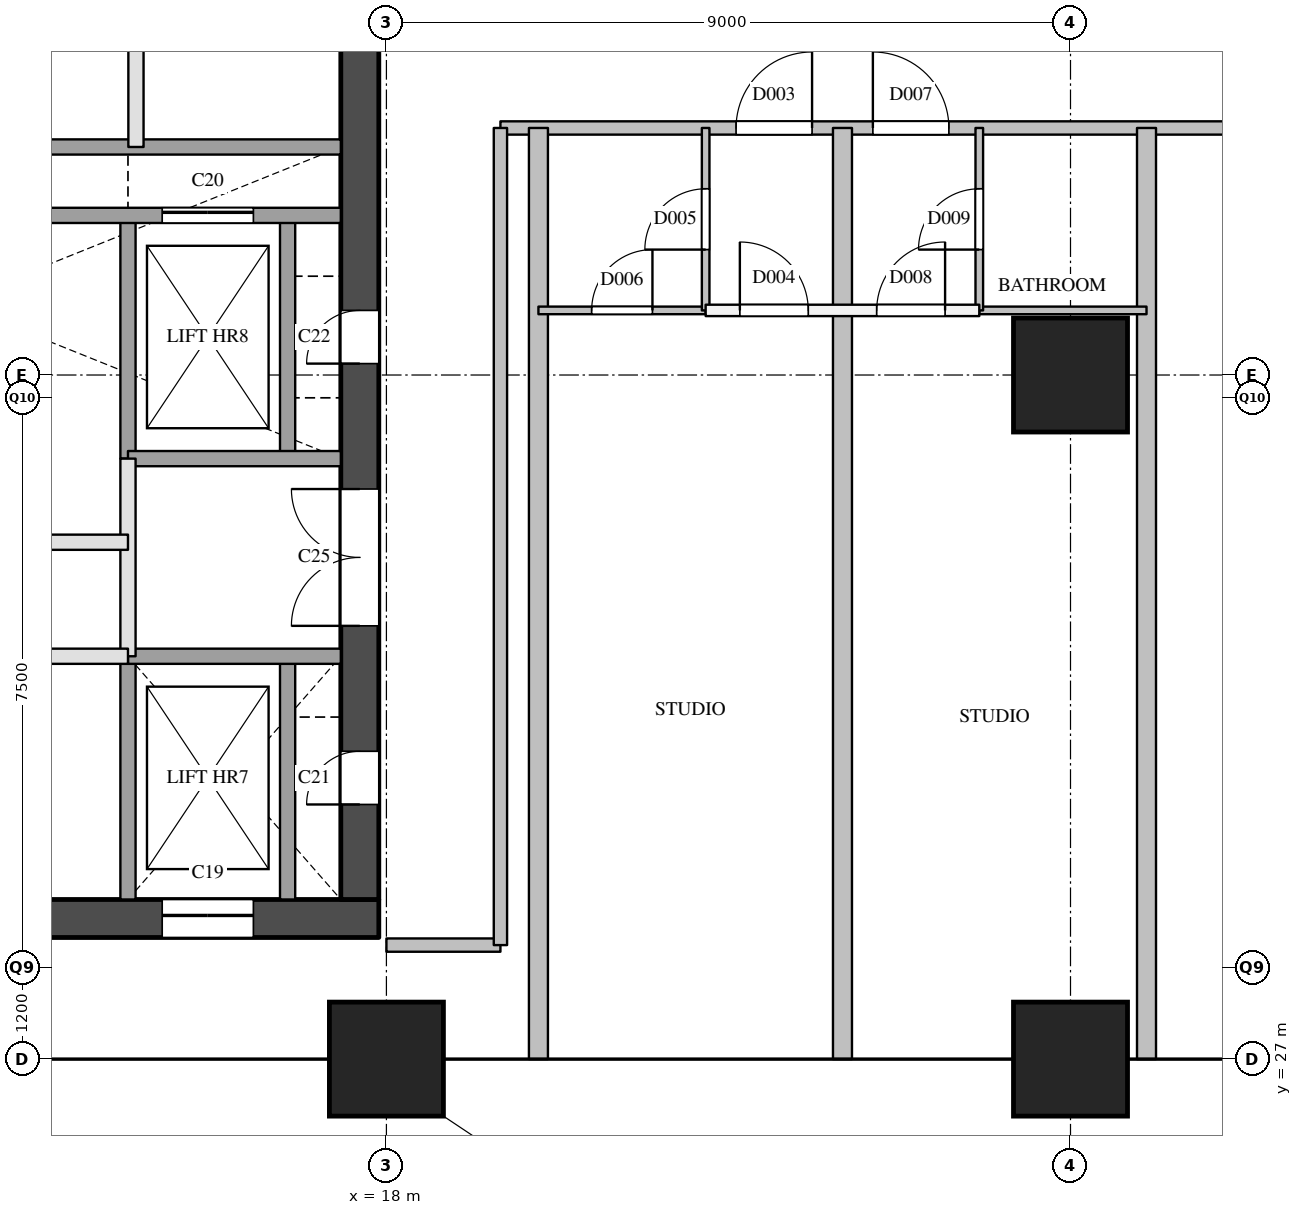
"""IFC4 building model, lengths in metres.
Left out: names, types, materials, properties, quantities, classifications, styles, units other than length and angle.
Written with IfcOpenShell. Run it as: python <this file> out.ifc"""

import sys

from ifc_helpers import new_model, si_unit, direction, frame, frame_2d, origin, origin_2d, place, context, subcontext, project, spatial, rectangle, extrude, element, fill, save


model = new_model("IFC4")
c1 = context("Model", 3, precision=1e-05, world=origin(), true_north=direction((0.0, 1.0)))
c2 = subcontext(c1, "Body", "Model", "MODEL_VIEW")
j1 = project(units=[si_unit("LENGTHUNIT", "METRE"), si_unit("PLANEANGLEUNIT", "RADIAN")], contexts=[c1])
p1 = place(None, origin())
s1 = spatial("IfcSite", under=j1, at=p1, CompositionType="ELEMENT")
p2 = place(p1, origin())
s2 = spatial("IfcBuilding", under=s1, at=p2, CompositionType="ELEMENT")
p3 = place(p2, frame((0.0, 0.0, 173.9)))
s3 = spatial("IfcBuildingStorey", under=s2, at=p3, CompositionType="ELEMENT", Elevation=173.9)
for number, where, z_axis, x_axis in (
    (1, (18.0, 27.0, 0.0), (0.0, 0.0, 1.0), (1.0, 0.0, 0.0)),
    (2, (27.0, 27.0, 0.0), (0.0, 0.0, 1.0), (1.0, 0.0, 0.0)),
    (3, (27.0, 36.0, 0.0), (0.0, 0.0, 1.0), (1.0, 0.0, 0.0)),
):
    element("IfcColumn", number, at=place(p3, frame(where, z_axis=z_axis, x_axis=x_axis)), inside=s3, PredefinedType="COLUMN", context=c2, shape_type="SweptSolid", body=[
        extrude(rectangle(XDim=1.5, YDim=1.5, at=origin_2d()), origin(), (0.0, 0.0, 1.0), 3.9),
    ])
p4 = place(p3, frame((5.7, 28.85, 0.0), z_axis=(0.0, 0.0, 1.0), x_axis=(1.0, 0.0, 0.0)))
e4 = element("IfcWall", 4, at=p4, inside=s3, PredefinedType="SHEAR", context=c2, shape_type="SweptSolid", body=[
    extrude(rectangle(XDim=12.2, YDim=0.5, at=frame_2d((6.1, 0.0))), origin(), (0.0, 0.0, 1.0), 3.6),
])
p5 = place(p4, frame((9.35, 0.0, 0.0)))
e5 = element("IfcOpeningElement", 5, at=p5, cuts=e4, PredefinedType="OPENING", context=c2, shape_type="SweptSolid", body=[
    extrude(rectangle(XDim=1.2, YDim=2.1, at=frame_2d((0.6, 1.05))), frame((0.0, 0.26, 0.0), z_axis=(0.0, -1.0, 0.0), x_axis=(1.0, 0.0, 0.0)), (0.0, 0.0, 1.0), 0.52),
])
p6 = place(p3, frame((17.65, 29.1, 0.0), z_axis=(0.0, 0.0, 1.0), x_axis=(0.0, 1.0, 0.0)))
e6 = element("IfcWall", 6, at=p6, inside=s3, PredefinedType="SHEAR", context=c2, shape_type="SweptSolid", body=[
    extrude(rectangle(XDim=20.3, YDim=0.5, at=frame_2d((10.15, 0.0))), origin(), (0.0, 0.0, 1.0), 3.6),
])
p7 = place(p6, frame((1.25, 0.0, 0.0)))
e7 = element("IfcOpeningElement", 7, at=p7, cuts=e6, PredefinedType="OPENING", context=c2, shape_type="SweptSolid", body=[
    extrude(rectangle(XDim=0.7, YDim=2.1, at=frame_2d((0.35, 1.05))), frame((0.0, 0.26, 0.0), z_axis=(0.0, -1.0, 0.0), x_axis=(1.0, 0.0, 0.0)), (0.0, 0.0, 1.0), 0.52),
])
p8 = place(p6, frame((7.05, 0.0, 0.0)))
e8 = element("IfcOpeningElement", 8, at=p8, cuts=e6, PredefinedType="OPENING", context=c2, shape_type="SweptSolid", body=[
    extrude(rectangle(XDim=0.7, YDim=2.1, at=frame_2d((0.35, 1.05))), frame((0.0, 0.26, 0.0), z_axis=(0.0, -1.0, 0.0), x_axis=(1.0, 0.0, 0.0)), (0.0, 0.0, 1.0), 0.52),
])
p9 = place(p6, frame((3.6, 0.0, 0.0)))
e9 = element("IfcOpeningElement", 9, at=p9, cuts=e6, PredefinedType="OPENING", context=c2, shape_type="SweptSolid", body=[
    extrude(rectangle(XDim=1.8, YDim=2.1, at=frame_2d((0.9, 1.05))), frame((0.0, 0.26, 0.0), z_axis=(0.0, -1.0, 0.0), x_axis=(1.0, 0.0, 0.0)), (0.0, 0.0, 1.0), 0.52),
])
p10 = place(p3, frame((14.6, 32.3, 0.0), z_axis=(0.0, 0.0, 1.0), x_axis=(0.0, 1.0, 0.0)))
e10 = element("IfcWall", 10, at=p10, inside=s3, PredefinedType="PARTITIONING", context=c2, shape_type="SweptSolid", body=[
    extrude(rectangle(XDim=2.6, YDim=0.2, at=frame_2d((1.3, 0.0))), origin(), (0.0, 0.0, 1.0), 3.6),
])
p11 = place(p3, frame((14.6, 29.1, 0.0), z_axis=(0.0, 0.0, 1.0), x_axis=(0.0, 1.0, 0.0)))
e11 = element("IfcWall", 11, at=p11, inside=s3, PredefinedType="SOLIDWALL", context=c2, shape_type="SweptSolid", body=[
    extrude(rectangle(XDim=3.2, YDim=0.2, at=frame_2d((1.6, 0.0))), origin(), (0.0, 0.0, 1.0), 3.6),
])
p12 = place(p3, frame((14.6, 34.9, 0.0), z_axis=(0.0, 0.0, 1.0), x_axis=(0.0, 1.0, 0.0)))
e12 = element("IfcWall", 12, at=p12, inside=s3, PredefinedType="SOLIDWALL", context=c2, shape_type="SweptSolid", body=[
    extrude(rectangle(XDim=3.2, YDim=0.2, at=frame_2d((1.6, 0.0))), origin(), (0.0, 0.0, 1.0), 3.6),
])
p13 = place(p3, frame((14.705, 39.0, 0.0), z_axis=(0.0, 0.0, 1.0), x_axis=(0.0, 1.0, 0.0)))
e13 = element("IfcWall", 13, at=p13, inside=s3, PredefinedType="PARTITIONING", context=c2, shape_type="SweptSolid", body=[
    extrude(rectangle(XDim=6.2, YDim=0.2, at=frame_2d((3.1, 0.0))), origin(), (0.0, 0.0, 1.0), 3.6),
])
p14 = place(p3, frame((16.7, 29.1, 0.0), z_axis=(0.0, 0.0, 1.0), x_axis=(0.0, 1.0, 0.0)))
e14 = element("IfcWall", 14, at=p14, inside=s3, PredefinedType="SOLIDWALL", context=c2, shape_type="SweptSolid", body=[
    extrude(rectangle(XDim=3.2, YDim=0.2, at=frame_2d((1.6, 0.0))), origin(), (0.0, 0.0, 1.0), 3.6),
])
p15 = place(p3, frame((16.7, 34.9, 0.0), z_axis=(0.0, 0.0, 1.0), x_axis=(0.0, 1.0, 0.0)))
e15 = element("IfcWall", 15, at=p15, inside=s3, PredefinedType="SOLIDWALL", context=c2, shape_type="SweptSolid", body=[
    extrude(rectangle(XDim=3.2, YDim=0.2, at=frame_2d((1.6, 0.0))), origin(), (0.0, 0.0, 1.0), 3.6),
])
p16 = place(p3, frame((6.2, 32.3, 0.0), z_axis=(0.0, 0.0, 1.0), x_axis=(1.0, 0.0, 0.0)))
e16 = element("IfcWall", 16, at=p16, inside=s3, PredefinedType="PARTITIONING", context=c2, shape_type="SweptSolid", body=[
    extrude(rectangle(XDim=8.4, YDim=0.2, at=frame_2d((4.2, 0.0))), origin(), (0.0, 0.0, 1.0), 3.6),
])
p17 = place(p16, frame((3.75, 0.0, 0.0)))
e17 = element("IfcOpeningElement", 17, at=p17, cuts=e16, PredefinedType="OPENING", context=c2, shape_type="SweptSolid", body=[
    extrude(rectangle(XDim=0.9, YDim=2.1, at=frame_2d((0.45, 1.05))), frame((0.0, 0.11, 0.0), z_axis=(0.0, -1.0, 0.0), x_axis=(1.0, 0.0, 0.0)), (0.0, 0.0, 1.0), 0.22),
])
p18 = place(p3, frame((14.6, 32.3, 0.0), z_axis=(0.0, 0.0, 1.0), x_axis=(1.0, 0.0, 0.0)))
e18 = element("IfcWall", 18, at=p18, inside=s3, PredefinedType="SOLIDWALL", context=c2, shape_type="SweptSolid", body=[
    extrude(rectangle(XDim=2.8, YDim=0.2, at=frame_2d((1.4, 0.0))), origin(), (0.0, 0.0, 1.0), 3.6),
])
p19 = place(p3, frame((6.2, 33.8, 0.0), z_axis=(0.0, 0.0, 1.0), x_axis=(1.0, 0.0, 0.0)))
e19 = element("IfcWall", 19, at=p19, inside=s3, PredefinedType="PARTITIONING", context=c2, shape_type="SweptSolid", body=[
    extrude(rectangle(XDim=8.4, YDim=0.2, at=frame_2d((4.2, 0.0))), origin(), (0.0, 0.0, 1.0), 3.6),
])
p20 = place(p19, frame((0.6, 0.0, 0.0)))
e20 = element("IfcOpeningElement", 20, at=p20, cuts=e19, PredefinedType="OPENING", context=c2, shape_type="SweptSolid", body=[
    extrude(rectangle(XDim=0.9, YDim=2.1, at=frame_2d((0.45, 1.05))), frame((0.0, 0.11, 0.0), z_axis=(0.0, -1.0, 0.0), x_axis=(1.0, 0.0, 0.0)), (0.0, 0.0, 1.0), 0.22),
])
p21 = place(p19, frame((4.8, 0.0, 0.0)))
e21 = element("IfcOpeningElement", 21, at=p21, cuts=e19, PredefinedType="OPENING", context=c2, shape_type="SweptSolid", body=[
    extrude(rectangle(XDim=0.9, YDim=2.1, at=frame_2d((0.45, 1.05))), frame((0.0, 0.11, 0.0), z_axis=(0.0, -1.0, 0.0), x_axis=(1.0, 0.0, 0.0)), (0.0, 0.0, 1.0), 0.22),
])
p22 = place(p3, frame((14.6, 34.9, 0.0), z_axis=(0.0, 0.0, 1.0), x_axis=(1.0, 0.0, 0.0)))
e22 = element("IfcWall", 22, at=p22, inside=s3, PredefinedType="SOLIDWALL", context=c2, shape_type="SweptSolid", body=[
    extrude(rectangle(XDim=2.8, YDim=0.2, at=frame_2d((1.4, 0.0))), origin(), (0.0, 0.0, 1.0), 3.6),
])
p23 = place(p3, frame((6.2, 38.1, 0.0), z_axis=(0.0, 0.0, 1.0), x_axis=(1.0, 0.0, 0.0)))
e23 = element("IfcWall", 23, at=p23, inside=s3, PredefinedType="SOLIDWALL", context=c2, shape_type="SweptSolid", body=[
    extrude(rectangle(XDim=11.2, YDim=0.2, at=frame_2d((5.6, 0.0))), origin(), (0.0, 0.0, 1.0), 3.6),
])
p24 = place(p23, frame((8.85, 0.0, 0.0)))
e24 = element("IfcOpeningElement", 24, at=p24, cuts=e23, PredefinedType="OPENING", context=c2, shape_type="SweptSolid", body=[
    extrude(rectangle(XDim=1.2, YDim=2.1, at=frame_2d((0.6, 1.05))), frame((0.0, 0.11, 0.0), z_axis=(0.0, -1.0, 0.0), x_axis=(1.0, 0.0, 0.0)), (0.0, 0.0, 1.0), 0.22),
])
p25 = place(p3, frame((12.5, 39.0, 0.0), z_axis=(0.0, 0.0, 1.0), x_axis=(1.0, 0.0, 0.0)))
e25 = element("IfcWall", 25, at=p25, inside=s3, PredefinedType="SOLIDWALL", context=c2, shape_type="SweptSolid", body=[
    extrude(rectangle(XDim=4.9, YDim=0.2, at=frame_2d((2.45, 0.0))), origin(), (0.0, 0.0, 1.0), 3.6),
])
p26 = place(p3, frame((18.0, 28.5, 0.0), z_axis=(0.0, 0.0, 1.0), x_axis=(1.0, 0.0, 0.0)))
e26 = element("IfcWall", 26, at=p26, inside=s3, PredefinedType="PARTITIONING", context=c2, shape_type="SweptSolid", body=[
    extrude(rectangle(XDim=1.5, YDim=0.175, at=frame_2d((0.75, 0.0))), origin(), (0.0, 0.0, 1.0), 3.6),
])
p27 = place(p3, frame((19.5, 39.25, 0.0), z_axis=(0.0, 0.0, 1.0), x_axis=(1.0, 0.0, 0.0)))
e27 = element("IfcWall", 27, at=p27, inside=s3, PredefinedType="PARTITIONING", context=c2, shape_type="SweptSolid", body=[
    extrude(rectangle(XDim=15.0, YDim=0.175, at=frame_2d((7.5, 0.0))), origin(), (0.0, 0.0, 1.0), 2.6),
])
p28 = place(p27, frame((3.1, 0.0, 0.0)))
e28 = element("IfcOpeningElement", 28, at=p28, cuts=e27, PredefinedType="OPENING", context=c2, shape_type="SweptSolid", body=[
    extrude(rectangle(XDim=1.0, YDim=2.1, at=frame_2d((0.5, 1.05))), frame((0.0, 0.097, 0.0), z_axis=(0.0, -1.0, 0.0), x_axis=(1.0, 0.0, 0.0)), (0.0, 0.0, 1.0), 0.195),
])
p29 = place(p27, frame((4.9, 0.0, 0.0)))
e29 = element("IfcOpeningElement", 29, at=p29, cuts=e27, PredefinedType="OPENING", context=c2, shape_type="SweptSolid", body=[
    extrude(rectangle(XDim=1.0, YDim=2.1, at=frame_2d((0.5, 1.05))), frame((0.0, 0.097, 0.0), z_axis=(0.0, -1.0, 0.0), x_axis=(1.0, 0.0, 0.0)), (0.0, 0.0, 1.0), 0.195),
])
p30 = place(p3, frame((19.5, 28.5, 0.0), z_axis=(0.0, 0.0, 1.0), x_axis=(0.0, 1.0, 0.0)))
e30 = element("IfcWall", 30, at=p30, inside=s3, PredefinedType="PARTITIONING", context=c2, shape_type="SweptSolid", body=[
    extrude(rectangle(XDim=10.75, YDim=0.175, at=frame_2d((5.375, 0.0))), origin(), (0.0, 0.0, 1.0), 3.6),
])
p31 = place(p3, frame((22.2, 36.85, 0.0), z_axis=(0.0, 0.0, 1.0), x_axis=(1.0, 0.0, 0.0)))
e31 = element("IfcWall", 31, at=p31, inside=s3, PredefinedType="PARTITIONING", context=c2, shape_type="SweptSolid", body=[
    extrude(rectangle(XDim=3.6, YDim=0.15, at=frame_2d((1.8, 0.0))), origin(), (0.0, 0.0, 1.0), 3.6),
])
p32 = place(p31, frame((0.45, 0.0, 0.0)))
e32 = element("IfcOpeningElement", 32, at=p32, cuts=e31, PredefinedType="OPENING", context=c2, shape_type="SweptSolid", body=[
    extrude(rectangle(XDim=0.9, YDim=2.1, at=frame_2d((0.45, 1.05))), frame((0.0, 0.085, 0.0), z_axis=(0.0, -1.0, 0.0), x_axis=(1.0, 0.0, 0.0)), (0.0, 0.0, 1.0), 0.17),
])
p33 = place(p31, frame((2.25, 0.0, 0.0)))
e33 = element("IfcOpeningElement", 33, at=p33, cuts=e31, PredefinedType="OPENING", context=c2, shape_type="SweptSolid", body=[
    extrude(rectangle(XDim=0.9, YDim=2.1, at=frame_2d((0.45, 1.05))), frame((0.0, 0.085, 0.0), z_axis=(0.0, -1.0, 0.0), x_axis=(1.0, 0.0, 0.0)), (0.0, 0.0, 1.0), 0.17),
])
for number, where, z_axis, x_axis in (
    (34, (20.0, 27.0, 0.0), (0.0, 0.0, 1.0), (0.0, 1.0, 0.0)),
    (35, (24.0, 27.0, 0.0), (0.0, 0.0, 1.0), (0.0, 1.0, 0.0)),
    (36, (28.0, 27.0, 0.0), (0.0, 0.0, 1.0), (0.0, 1.0, 0.0)),
):
    element("IfcWall", number, at=place(p3, frame(where, z_axis=z_axis, x_axis=x_axis)), inside=s3, PredefinedType="PARTITIONING", context=c2, shape_type="SweptSolid", body=[
        extrude(rectangle(XDim=12.25, YDim=0.25, at=frame_2d((6.125, 0.0))), origin(), (0.0, 0.0, 1.0), 2.6),
    ])
p34 = place(p3, frame((20.0, 36.85, 0.0), z_axis=(0.0, 0.0, 1.0), x_axis=(1.0, 0.0, 0.0)))
e37 = element("IfcWall", 37, at=p34, inside=s3, PredefinedType="PARTITIONING", context=c2, shape_type="SweptSolid", body=[
    extrude(rectangle(XDim=2.2, YDim=0.1, at=frame_2d((1.1, 0.0))), origin(), (0.0, 0.0, 1.0), 3.6),
])
p35 = place(p34, frame((0.7, 0.0, 0.0)))
e38 = element("IfcOpeningElement", 38, at=p35, cuts=e37, PredefinedType="OPENING", context=c2, shape_type="SweptSolid", body=[
    extrude(rectangle(XDim=0.8, YDim=2.1, at=frame_2d((0.4, 1.05))), frame((0.0, 0.06, 0.0), z_axis=(0.0, -1.0, 0.0), x_axis=(1.0, 0.0, 0.0)), (0.0, 0.0, 1.0), 0.12),
])
p36 = place(p3, frame((25.8, 36.85, 0.0), z_axis=(0.0, 0.0, 1.0), x_axis=(1.0, 0.0, 0.0)))
e39 = element("IfcWall", 39, at=p36, inside=s3, PredefinedType="PARTITIONING", context=c2, shape_type="SweptSolid", body=[
    extrude(rectangle(XDim=2.2, YDim=0.1, at=frame_2d((1.1, 0.0))), origin(), (0.0, 0.0, 1.0), 2.6),
])
p37 = place(p3, frame((22.2, 36.85, 0.0), z_axis=(0.0, 0.0, 1.0), x_axis=(0.0, 1.0, 0.0)))
e40 = element("IfcWall", 40, at=p37, inside=s3, PredefinedType="PARTITIONING", context=c2, shape_type="SweptSolid", body=[
    extrude(rectangle(XDim=2.4, YDim=0.1, at=frame_2d((1.2, 0.0))), origin(), (0.0, 0.0, 1.0), 3.6),
])
p38 = place(p37, frame((0.8, 0.0, 0.0)))
e41 = element("IfcOpeningElement", 41, at=p38, cuts=e40, PredefinedType="OPENING", context=c2, shape_type="SweptSolid", body=[
    extrude(rectangle(XDim=0.8, YDim=2.1, at=frame_2d((0.4, 1.05))), frame((0.0, 0.06, 0.0), z_axis=(0.0, -1.0, 0.0), x_axis=(1.0, 0.0, 0.0)), (0.0, 0.0, 1.0), 0.12),
])
p39 = place(p3, frame((25.8, 36.85, 0.0), z_axis=(0.0, 0.0, 1.0), x_axis=(0.0, 1.0, 0.0)))
e42 = element("IfcWall", 42, at=p39, inside=s3, PredefinedType="PARTITIONING", context=c2, shape_type="SweptSolid", body=[
    extrude(rectangle(XDim=2.4, YDim=0.1, at=frame_2d((1.2, 0.0))), origin(), (0.0, 0.0, 1.0), 3.6),
])
p40 = place(p39, frame((0.8, 0.0, 0.0)))
e43 = element("IfcOpeningElement", 43, at=p40, cuts=e42, PredefinedType="OPENING", context=c2, shape_type="SweptSolid", body=[
    extrude(rectangle(XDim=0.8, YDim=2.1, at=frame_2d((0.4, 1.05))), frame((0.0, 0.06, 0.0), z_axis=(0.0, -1.0, 0.0), x_axis=(1.0, 0.0, 0.0)), (0.0, 0.0, 1.0), 0.12),
])
p41 = place(p5, origin())
e44 = element("IfcDoor", 44, at=p41, inside=s3, OperationType="SLIDING_TO_LEFT", PredefinedType="DOOR", context=c2, shape_type="SweptSolid", body=[
    extrude(rectangle(XDim=1.2, YDim=2.1, at=frame_2d((0.6, 1.05))), frame((0.0, 0.025, 0.0), z_axis=(0.0, -1.0, 0.0), x_axis=(1.0, 0.0, 0.0)), (0.0, 0.0, 1.0), 0.05),
])
fill(e5, e44)
p42 = place(p24, origin())
e45 = element("IfcDoor", 45, at=p42, inside=s3, OperationType="SLIDING_TO_LEFT", PredefinedType="DOOR", context=c2, shape_type="SweptSolid", body=[
    extrude(rectangle(XDim=1.2, YDim=2.1, at=frame_2d((0.6, 1.05))), frame((0.0, 0.025, 0.0), z_axis=(0.0, -1.0, 0.0), x_axis=(1.0, 0.0, 0.0)), (0.0, 0.0, 1.0), 0.05),
])
fill(e24, e45)
p43 = place(p7, origin())
e46 = element("IfcDoor", 46, at=p43, inside=s3, OperationType="SINGLE_SWING_LEFT", PredefinedType="DOOR", context=c2, shape_type="SweptSolid", body=[
    extrude(rectangle(XDim=0.7, YDim=2.1, at=frame_2d((0.35, 1.05))), frame((0.0, 0.025, 0.0), z_axis=(0.0, -1.0, 0.0), x_axis=(1.0, 0.0, 0.0)), (0.0, 0.0, 1.0), 0.05),
])
fill(e7, e46)
p44 = place(p8, origin())
e47 = element("IfcDoor", 47, at=p44, inside=s3, OperationType="SINGLE_SWING_LEFT", PredefinedType="DOOR", context=c2, shape_type="SweptSolid", body=[
    extrude(rectangle(XDim=0.7, YDim=2.1, at=frame_2d((0.35, 1.05))), frame((0.0, 0.025, 0.0), z_axis=(0.0, -1.0, 0.0), x_axis=(1.0, 0.0, 0.0)), (0.0, 0.0, 1.0), 0.05),
])
fill(e8, e47)
p45 = place(p9, origin())
e48 = element("IfcDoor", 48, at=p45, inside=s3, OperationType="DOUBLE_DOOR_SINGLE_SWING", PredefinedType="DOOR", context=c2, shape_type="SweptSolid", body=[
    extrude(rectangle(XDim=1.8, YDim=2.1, at=frame_2d((0.9, 1.05))), frame((0.0, 0.025, 0.0), z_axis=(0.0, -1.0, 0.0), x_axis=(1.0, 0.0, 0.0)), (0.0, 0.0, 1.0), 0.05),
])
fill(e9, e48)
p46 = place(p28, origin())
e49 = element("IfcDoor", 49, at=p46, inside=s3, OperationType="SINGLE_SWING_RIGHT", PredefinedType="DOOR", context=c2, shape_type="SweptSolid", body=[
    extrude(rectangle(XDim=1.0, YDim=2.1, at=frame_2d((0.5, 1.05))), frame((0.0, 0.025, 0.0), z_axis=(0.0, -1.0, 0.0), x_axis=(1.0, 0.0, 0.0)), (0.0, 0.0, 1.0), 0.05),
])
fill(e28, e49)
p47 = place(p32, origin())
e50 = element("IfcDoor", 50, at=p47, inside=s3, OperationType="SINGLE_SWING_LEFT", PredefinedType="DOOR", context=c2, shape_type="SweptSolid", body=[
    extrude(rectangle(XDim=0.9, YDim=2.1, at=frame_2d((0.45, 1.05))), frame((0.0, 0.025, 0.0), z_axis=(0.0, -1.0, 0.0), x_axis=(1.0, 0.0, 0.0)), (0.0, 0.0, 1.0), 0.05),
])
fill(e32, e50)
p48 = place(p38, origin())
e51 = element("IfcDoor", 51, at=p48, inside=s3, OperationType="SINGLE_SWING_LEFT", PredefinedType="DOOR", context=c2, shape_type="SweptSolid", body=[
    extrude(rectangle(XDim=0.8, YDim=2.1, at=frame_2d((0.4, 1.05))), frame((0.0, 0.025, 0.0), z_axis=(0.0, -1.0, 0.0), x_axis=(1.0, 0.0, 0.0)), (0.0, 0.0, 1.0), 0.05),
])
fill(e41, e51)
p49 = place(p35, origin())
e52 = element("IfcDoor", 52, at=p49, inside=s3, OperationType="SINGLE_SWING_RIGHT", PredefinedType="DOOR", context=c2, shape_type="SweptSolid", body=[
    extrude(rectangle(XDim=0.8, YDim=2.1, at=frame_2d((0.4, 1.05))), frame((0.0, 0.025, 0.0), z_axis=(0.0, -1.0, 0.0), x_axis=(1.0, 0.0, 0.0)), (0.0, 0.0, 1.0), 0.05),
])
fill(e38, e52)
p50 = place(p29, origin())
e53 = element("IfcDoor", 53, at=p50, inside=s3, OperationType="SINGLE_SWING_LEFT", PredefinedType="DOOR", context=c2, shape_type="SweptSolid", body=[
    extrude(rectangle(XDim=1.0, YDim=2.1, at=frame_2d((0.5, 1.05))), frame((0.0, 0.025, 0.0), z_axis=(0.0, -1.0, 0.0), x_axis=(1.0, 0.0, 0.0)), (0.0, 0.0, 1.0), 0.05),
])
fill(e29, e53)
p51 = place(p33, origin())
e54 = element("IfcDoor", 54, at=p51, inside=s3, OperationType="SINGLE_SWING_RIGHT", PredefinedType="DOOR", context=c2, shape_type="SweptSolid", body=[
    extrude(rectangle(XDim=0.9, YDim=2.1, at=frame_2d((0.45, 1.05))), frame((0.0, 0.025, 0.0), z_axis=(0.0, -1.0, 0.0), x_axis=(1.0, 0.0, 0.0)), (0.0, 0.0, 1.0), 0.05),
])
fill(e33, e54)
p52 = place(p40, origin())
e55 = element("IfcDoor", 55, at=p52, inside=s3, OperationType="SINGLE_SWING_LEFT", PredefinedType="DOOR", context=c2, shape_type="SweptSolid", body=[
    extrude(rectangle(XDim=0.8, YDim=2.1, at=frame_2d((0.4, 1.05))), frame((0.0, 0.025, 0.0), z_axis=(0.0, -1.0, 0.0), x_axis=(1.0, 0.0, 0.0)), (0.0, 0.0, 1.0), 0.05),
])
fill(e43, e55)
save(model, sys.argv[1])
